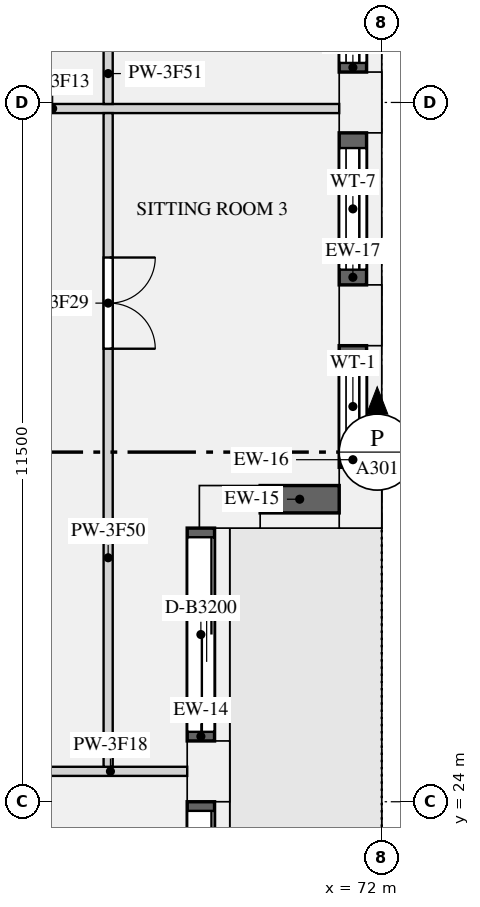
"""IFC4 building model, lengths in metres.
Left out: names, types, materials, properties, quantities, classifications, styles, units other than length and angle.
Written with IfcOpenShell. Run it as: python <this file> out.ifc"""

import sys

from ifc_helpers import new_model, si_unit, direction, frame, frame_2d, origin, origin_2d, place, context, subcontext, project, spatial, rectangle, extrude, element, fill, save


model = new_model("IFC4")
c1 = context("Model", 3, precision=1e-05, world=origin(), true_north=direction((0.0, 1.0)))
c2 = subcontext(c1, "Body", "Model", "MODEL_VIEW")
j1 = project(units=[si_unit("LENGTHUNIT", "METRE"), si_unit("PLANEANGLEUNIT", "RADIAN")], contexts=[c1])
p1 = place(None, origin())
s1 = spatial("IfcSite", under=j1, at=p1, CompositionType="ELEMENT")
p2 = place(p1, origin())
s2 = spatial("IfcBuilding", under=s1, at=p2, CompositionType="ELEMENT")
p3 = place(p2, frame((0.0, 0.0, 182.25)))
s3 = spatial("IfcBuildingStorey", under=s2, at=p3, CompositionType="ELEMENT", Elevation=182.25)
for number, where, z_axis, x_axis in (
    (1, (69.15, 24.5, 0.0), (0.0, 0.0, 1.0), (0.0, 1.0, 0.0)),
    (2, (69.5, 28.85, 0.0), (0.0, 0.0, 1.0), (1.0, 0.0, 0.0)),
    (3, (71.65, 29.0, 0.0), (0.0, 0.0, 1.0), (0.0, 1.0, 0.0)),
):
    element("IfcColumn", number, at=place(p3, frame(where, z_axis=z_axis, x_axis=x_axis)), inside=s3, PredefinedType="USERDEFINED", context=c2, shape_type="SweptSolid", body=[
        extrude(rectangle(XDim=1.0, YDim=0.7, at=origin_2d()), origin(), (0.0, 0.0, 1.0), 3.15),
    ])
for number, where, z_axis, x_axis in (
    (4, (71.65, 32.0, 0.0), (0.0, 0.0, 1.0), (0.0, 1.0, 0.0)),
    (5, (71.65, 35.5, 0.0), (0.0, 0.0, 1.0), (0.0, 1.0, 0.0)),
):
    element("IfcColumn", number, at=place(p3, frame(where, z_axis=z_axis, x_axis=x_axis)), inside=s3, PredefinedType="USERDEFINED", context=c2, shape_type="SweptSolid", body=[
        extrude(rectangle(XDim=1.0, YDim=0.7, at=origin_2d()), origin(), (0.0, 0.0, 1.0), 2.65),
    ])
p4 = place(p3, frame((69.025, 21.0, 0.0), z_axis=(0.0, 0.0, 1.0), x_axis=(0.0, 1.0, 0.0)))
e6 = element("IfcWall", 6, at=p4, inside=s3, PredefinedType="SOLIDWALL", context=c2, shape_type="SweptSolid", body=[
    extrude(rectangle(XDim=3.0, YDim=0.45, at=frame_2d((1.5, 0.0))), origin(), (0.0, 0.0, 1.0), 2.65),
])
p5 = place(p4, frame((0.15, 0.0, 0.0)))
e7 = element("IfcOpeningElement", 7, at=p5, cuts=e6, PredefinedType="OPENING", context=c2, shape_type="SweptSolid", body=[
    extrude(rectangle(XDim=2.7, YDim=2.3, at=frame_2d((1.35, 1.15))), frame((0.0, 0.235, 0.0), z_axis=(0.0, -1.0, 0.0), x_axis=(1.0, 0.0, 0.0)), (0.0, 0.0, 1.0), 0.47),
])
p6 = place(p3, frame((69.025, 25.0, 0.0), z_axis=(0.0, 0.0, 1.0), x_axis=(0.0, 1.0, 0.0)))
e8 = element("IfcWall", 8, at=p6, inside=s3, PredefinedType="SOLIDWALL", context=c2, shape_type="SweptSolid", body=[
    extrude(rectangle(XDim=3.5, YDim=0.45, at=frame_2d((1.75, 0.0))), origin(), (0.0, 0.0, 1.0), 2.65),
])
p7 = place(p6, frame((0.15, 0.0, 0.0)))
e9 = element("IfcOpeningElement", 9, at=p7, cuts=e8, PredefinedType="OPENING", context=c2, shape_type="SweptSolid", body=[
    extrude(rectangle(XDim=3.2, YDim=2.3, at=frame_2d((1.6, 1.15))), frame((0.0, 0.235, 0.0), z_axis=(0.0, -1.0, 0.0), x_axis=(1.0, 0.0, 0.0)), (0.0, 0.0, 1.0), 0.47),
])
p8 = place(p3, frame((70.0, 28.975, 0.9), z_axis=(0.0, 0.0, 1.0), x_axis=(1.0, 0.0, 0.0)))
e10 = element("IfcWall", 10, at=p8, inside=s3, PredefinedType="SOLIDWALL", context=c2, shape_type="SweptSolid", body=[
    extrude(rectangle(XDim=1.3, YDim=0.45, at=frame_2d((0.65, 0.0))), origin(), (0.0, 0.0, 1.0), 1.75),
])
p9 = place(p3, frame((71.525, 29.5, 0.9), z_axis=(0.0, 0.0, 1.0), x_axis=(0.0, 1.0, 0.0)))
e11 = element("IfcWall", 11, at=p9, inside=s3, PredefinedType="SOLIDWALL", context=c2, shape_type="SweptSolid", body=[
    extrude(rectangle(XDim=2.0, YDim=0.45, at=frame_2d((1.0, 0.0))), origin(), (0.0, 0.0, 1.0), 1.75),
])
p10 = place(p9, frame((0.25, 0.0, 0.15)))
e12 = element("IfcOpeningElement", 12, at=p10, cuts=e11, PredefinedType="OPENING", context=c2, shape_type="SweptSolid", body=[
    extrude(rectangle(XDim=1.5, YDim=1.5, at=frame_2d((0.75, 0.75))), frame((0.0, 0.235, 0.0), z_axis=(0.0, -1.0, 0.0), x_axis=(1.0, 0.0, 0.0)), (0.0, 0.0, 1.0), 0.47),
])
p11 = place(p3, frame((71.525, 32.5, 0.9), z_axis=(0.0, 0.0, 1.0), x_axis=(0.0, 1.0, 0.0)))
e13 = element("IfcWall", 13, at=p11, inside=s3, PredefinedType="SOLIDWALL", context=c2, shape_type="SweptSolid", body=[
    extrude(rectangle(XDim=2.5, YDim=0.45, at=frame_2d((1.25, 0.0))), origin(), (0.0, 0.0, 1.0), 1.75),
])
p12 = place(p11, frame((0.25, 0.0, 0.15)))
e14 = element("IfcOpeningElement", 14, at=p12, cuts=e13, PredefinedType="OPENING", context=c2, shape_type="SweptSolid", body=[
    extrude(rectangle(XDim=2.0, YDim=1.5, at=frame_2d((1.0, 0.75))), frame((0.0, 0.235, 0.0), z_axis=(0.0, -1.0, 0.0), x_axis=(1.0, 0.0, 0.0)), (0.0, 0.0, 1.0), 0.47),
])
p13 = place(p3, frame((71.525, 36.0, 0.9), z_axis=(0.0, 0.0, 1.0), x_axis=(0.0, 1.0, 0.0)))
e15 = element("IfcWall", 15, at=p13, inside=s3, PredefinedType="SOLIDWALL", context=c2, shape_type="SweptSolid", body=[
    extrude(rectangle(XDim=2.3, YDim=0.45, at=frame_2d((1.15, 0.0))), origin(), (0.0, 0.0, 1.0), 1.75),
])
p14 = place(p13, frame((0.15, 0.0, 0.15)))
e16 = element("IfcOpeningElement", 16, at=p14, cuts=e15, PredefinedType="OPENING", context=c2, shape_type="SweptSolid", body=[
    extrude(rectangle(XDim=2.0, YDim=1.5, at=frame_2d((1.0, 0.75))), frame((0.0, 0.235, 0.0), z_axis=(0.0, -1.0, 0.0), x_axis=(1.0, 0.0, 0.0)), (0.0, 0.0, 1.0), 0.47),
])
p15 = place(p3, frame((59.8, 35.4, 0.0), z_axis=(0.0, 0.0, 1.0), x_axis=(1.0, 0.0, 0.0)))
e17 = element("IfcWall", 17, at=p15, inside=s3, PredefinedType="PARTITIONING", context=c2, shape_type="SweptSolid", body=[
    extrude(rectangle(XDim=11.5, YDim=0.15, at=frame_2d((5.75, 0.0))), origin(), (0.0, 0.0, 1.0), 2.65),
])
p16 = place(p15, frame((0.575, 0.0, 0.0)))
e18 = element("IfcOpeningElement", 18, at=p16, cuts=e17, PredefinedType="OPENING", context=c2, shape_type="SweptSolid", body=[
    extrude(rectangle(XDim=1.5, YDim=2.1, at=frame_2d((0.75, 1.05))), frame((0.0, 0.085, 0.0), z_axis=(0.0, -1.0, 0.0), x_axis=(1.0, 0.0, 0.0)), (0.0, 0.0, 1.0), 0.17),
])
p17 = place(p3, frame((63.075, 24.5, 0.0), z_axis=(0.0, 0.0, 1.0), x_axis=(1.0, 0.0, 0.0)))
e19 = element("IfcWall", 19, at=p17, inside=s3, PredefinedType="PARTITIONING", context=c2, shape_type="SweptSolid", body=[
    extrude(rectangle(XDim=5.725, YDim=0.15, at=frame_2d((2.863, 0.0))), origin(), (0.0, 0.0, 1.0), 2.65),
])
p18 = place(p17, frame((1.7, 0.0, 0.0)))
e20 = element("IfcOpeningElement", 20, at=p18, cuts=e19, PredefinedType="OPENING", context=c2, shape_type="SweptSolid", body=[
    extrude(rectangle(XDim=1.5, YDim=2.1, at=frame_2d((0.75, 1.05))), frame((0.0, 0.085, 0.0), z_axis=(0.0, -1.0, 0.0), x_axis=(1.0, 0.0, 0.0)), (0.0, 0.0, 1.0), 0.17),
])
p19 = place(p3, frame((67.5, 24.575, 0.0), z_axis=(0.0, 0.0, 1.0), x_axis=(0.0, 1.0, 0.0)))
e21 = element("IfcWall", 21, at=p19, inside=s3, PredefinedType="PARTITIONING", context=c2, shape_type="SweptSolid", body=[
    extrude(rectangle(XDim=10.75, YDim=0.15, at=frame_2d((5.375, 0.0))), origin(), (0.0, 0.0, 1.0), 2.65),
])
p20 = place(p19, frame((6.875, 0.0, 0.0)))
e22 = element("IfcOpeningElement", 22, at=p20, cuts=e21, PredefinedType="OPENING", context=c2, shape_type="SweptSolid", body=[
    extrude(rectangle(XDim=1.5, YDim=2.1, at=frame_2d((0.75, 1.05))), frame((0.0, 0.085, 0.0), z_axis=(0.0, -1.0, 0.0), x_axis=(1.0, 0.0, 0.0)), (0.0, 0.0, 1.0), 0.17),
])
p21 = place(p3, frame((67.5, 35.475, 0.0), z_axis=(0.0, 0.0, 1.0), x_axis=(0.0, 1.0, 0.0)))
e23 = element("IfcWall", 23, at=p21, inside=s3, PredefinedType="PARTITIONING", context=c2, shape_type="SweptSolid", body=[
    extrude(rectangle(XDim=2.825, YDim=0.15, at=frame_2d((1.413, 0.0))), origin(), (0.0, 0.0, 1.0), 2.65),
])
p22 = place(p21, frame((1.0, 0.0, 0.0)))
e24 = element("IfcOpeningElement", 24, at=p22, cuts=e23, PredefinedType="OPENING", context=c2, shape_type="SweptSolid", body=[
    extrude(rectangle(XDim=0.9, YDim=2.1, at=frame_2d((0.45, 1.05))), frame((0.0, 0.085, 0.0), z_axis=(0.0, -1.0, 0.0), x_axis=(1.0, 0.0, 0.0)), (0.0, 0.0, 1.0), 0.17),
])
p23 = place(p5, origin())
e25 = element("IfcDoor", 25, at=p23, inside=s3, OperationType="SLIDING_TO_LEFT", PredefinedType="DOOR", context=c2, shape_type="SweptSolid", body=[
    extrude(rectangle(XDim=2.7, YDim=2.3, at=frame_2d((1.35, 1.15))), frame((0.0, -0.07, 0.0), z_axis=(0.0, -1.0, 0.0), x_axis=(1.0, 0.0, 0.0)), (0.0, 0.0, 1.0), 0.05),
])
fill(e7, e25)
p24 = place(p7, origin())
e26 = element("IfcDoor", 26, at=p24, inside=s3, OperationType="SLIDING_TO_LEFT", PredefinedType="DOOR", context=c2, shape_type="SweptSolid", body=[
    extrude(rectangle(XDim=3.2, YDim=2.3, at=frame_2d((1.6, 1.15))), frame((0.0, -0.07, 0.0), z_axis=(0.0, -1.0, 0.0), x_axis=(1.0, 0.0, 0.0)), (0.0, 0.0, 1.0), 0.05),
])
fill(e9, e26)
p25 = place(p10, origin())
e27 = element("IfcWindow", 27, at=p25, inside=s3, PartitioningType="SINGLE_PANEL", PredefinedType="WINDOW", context=c2, shape_type="SweptSolid", body=[
    extrude(rectangle(XDim=1.5, YDim=1.5, at=frame_2d((0.75, 0.75))), frame((0.0, -0.065, 0.0), z_axis=(0.0, -1.0, 0.0), x_axis=(1.0, 0.0, 0.0)), (0.0, 0.0, 1.0), 0.06),
])
fill(e12, e27)
p26 = place(p12, origin())
e28 = element("IfcWindow", 28, at=p26, inside=s3, PartitioningType="SINGLE_PANEL", PredefinedType="WINDOW", context=c2, shape_type="SweptSolid", body=[
    extrude(rectangle(XDim=2.0, YDim=1.5, at=frame_2d((1.0, 0.75))), frame((0.0, -0.065, 0.0), z_axis=(0.0, -1.0, 0.0), x_axis=(1.0, 0.0, 0.0)), (0.0, 0.0, 1.0), 0.06),
])
fill(e14, e28)
p27 = place(p14, origin())
e29 = element("IfcWindow", 29, at=p27, inside=s3, PartitioningType="SINGLE_PANEL", PredefinedType="WINDOW", context=c2, shape_type="SweptSolid", body=[
    extrude(rectangle(XDim=2.0, YDim=1.5, at=frame_2d((1.0, 0.75))), frame((0.0, -0.065, 0.0), z_axis=(0.0, -1.0, 0.0), x_axis=(1.0, 0.0, 0.0)), (0.0, 0.0, 1.0), 0.06),
])
fill(e16, e29)
p28 = place(p20, frame((1.5, 0.0, 0.0), z_axis=(0.0, 0.0, 1.0), x_axis=(-1.0, 0.0, 0.0)))
e30 = element("IfcDoor", 30, at=p28, inside=s3, OperationType="DOUBLE_DOOR_SINGLE_SWING", PredefinedType="DOOR", context=c2, shape_type="SweptSolid", body=[
    extrude(rectangle(XDim=1.5, YDim=2.1, at=frame_2d((0.75, 1.05))), frame((0.0, 0.025, 0.0), z_axis=(0.0, -1.0, 0.0), x_axis=(1.0, 0.0, 0.0)), (0.0, 0.0, 1.0), 0.05),
])
fill(e22, e30)
save(model, sys.argv[1])
